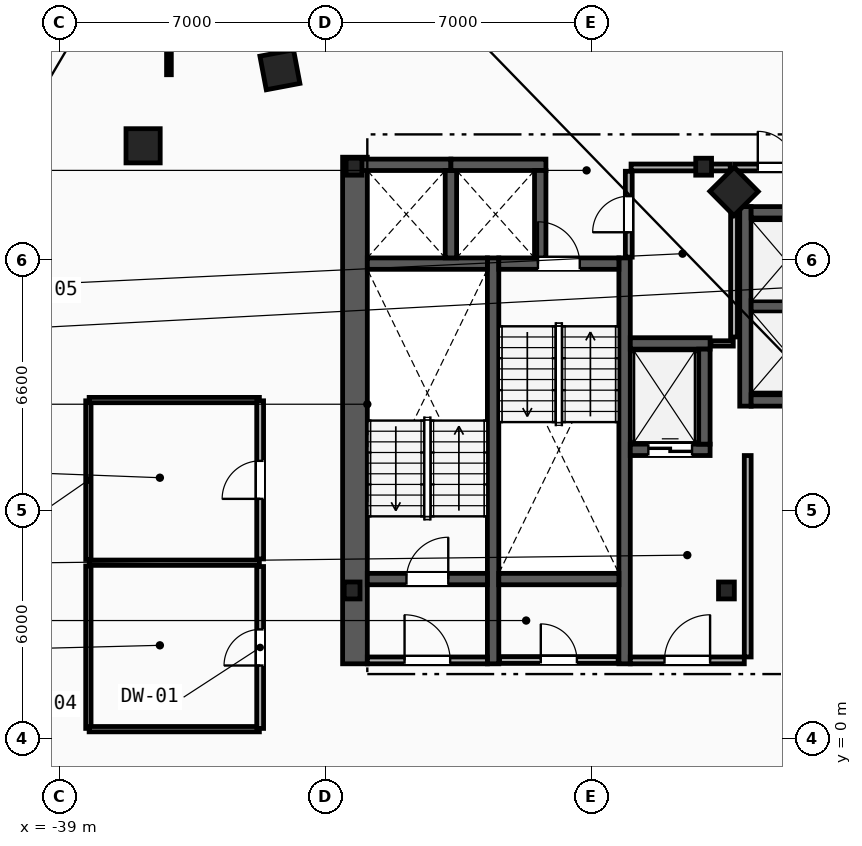
"""IFC4 building model, lengths in metres.
Left out: names, types, materials, properties, quantities, classifications, styles, units other than length and angle.
Written with IfcOpenShell. Run it as: python <this file> out.ifc"""

import sys

from ifc_helpers import new_model, si_unit, direction, frame, frame_2d, origin, origin_2d, place, context, subcontext, project, spatial, rectangle, i_section, extrude, element, fill, save


model = new_model("IFC4")
c1 = context("Model", 3, precision=1e-05, world=origin(), true_north=direction((0.0, 1.0)))
c2 = subcontext(c1, "Body", "Model", "MODEL_VIEW")
j1 = project(units=[si_unit("LENGTHUNIT", "METRE"), si_unit("PLANEANGLEUNIT", "RADIAN")], contexts=[c1])
p1 = place(None, origin())
s1 = spatial("IfcSite", under=j1, at=p1, CompositionType="ELEMENT")
p2 = place(p1, origin())
s2 = spatial("IfcBuilding", under=s1, at=p2, CompositionType="ELEMENT")
p3 = place(p2, frame((0.0, 0.0, 231.4)))
s3 = spatial("IfcBuildingStorey", under=s2, at=p3, CompositionType="ELEMENT", Elevation=231.4)
for number, where, z_axis, x_axis in (
    (1, (-31.3, 3.9, 0.0), (0.0, 0.0, 1.0), (1.0, 0.0, 0.0)),
    (2, (-21.45, 3.9, 0.0), (0.0, 0.0, 1.0), (1.0, 0.0, 0.0)),
    (3, (-22.05, 15.05, 0.0), (0.0, 0.0, 1.0), (1.0, 0.0, 0.0)),
    (4, (-31.25, 15.05, 0.0), (0.0, 0.0, 1.0), (1.0, 0.0, 0.0)),
):
    element("IfcColumn", number, at=place(p3, frame(where, z_axis=z_axis, x_axis=x_axis)), inside=s3, PredefinedType="COLUMN", context=c2, shape_type="SweptSolid", body=[
        extrude(i_section(OverallWidth=0.416, OverallDepth=0.446, WebThickness=0.039, FlangeThickness=0.063, FilletRadius=0.018, at=origin_2d()), origin(), (0.0, 0.0, 1.0), 3.6),
    ])
for number, where, z_axis, x_axis in (
    (5, (-36.8, 15.6, 0.0), (0.0, 0.0, 1.0), (1.0, 0.0, 0.0)),
    (6, (-21.25, 14.4, 0.0), (0.0, 0.0, 1.0), (-0.703, 0.711, 0.0)),
    (7, (-33.2, 17.6, 0.0), (0.0, 0.0, 1.0), (-0.983, -0.186, 0.0)),
):
    element("IfcColumn", number, at=place(p3, frame(where, z_axis=z_axis, x_axis=x_axis)), inside=s3, PredefinedType="COLUMN", context=c2, shape_type="SweptSolid", body=[
        extrude(rectangle(XDim=0.9, YDim=0.9, at=origin_2d()), origin(), (0.0, 0.0, 1.0), 3.6),
    ])
p4 = place(p3, frame((-31.225, 1.97, 0.0), z_axis=(0.0, 0.0, 1.0), x_axis=(0.0, 1.0, 0.0)))
e8 = element("IfcWall", 8, at=p4, inside=s3, PredefinedType="SHEAR", context=c2, shape_type="SweptSolid", body=[
    extrude(rectangle(XDim=13.33, YDim=0.65, at=frame_2d((6.665, 0.0))), origin(), (0.0, 0.0, 1.0), 3.32),
])
for number, where, z_axis, x_axis in (
    (9, (-27.59, 1.97, 0.0), (0.0, 0.0, 1.0), (0.0, 1.0, 0.0)),
    (10, (-24.13, 1.97, 0.0), (0.0, 0.0, 1.0), (0.0, 1.0, 0.0)),
):
    element("IfcWall", number, at=place(p3, frame(where, z_axis=z_axis, x_axis=x_axis)), inside=s3, PredefinedType="SHEAR", context=c2, shape_type="SweptSolid", body=[
        extrude(rectangle(XDim=10.68, YDim=0.3, at=frame_2d((5.34, 0.0))), origin(), (0.0, 0.0, 1.0), 3.32),
    ])
p5 = place(p3, frame((-30.9, 4.2, 0.0), z_axis=(0.0, 0.0, 1.0), x_axis=(1.0, 0.0, 0.0)))
e11 = element("IfcWall", 11, at=p5, inside=s3, PredefinedType="SHEAR", context=c2, shape_type="SweptSolid", body=[
    extrude(rectangle(XDim=3.16, YDim=0.3, at=frame_2d((1.58, 0.0))), origin(), (0.0, 0.0, 1.0), 3.32),
])
p6 = place(p5, frame((1.03, 0.0, 0.0)))
e12 = element("IfcOpeningElement", 12, at=p6, cuts=e11, PredefinedType="OPENING", context=c2, shape_type="SweptSolid", body=[
    extrude(rectangle(XDim=1.1, YDim=2.15, at=frame_2d((0.55, 1.075))), frame((0.0, 0.16, 0.0), z_axis=(0.0, -1.0, 0.0), x_axis=(1.0, 0.0, 0.0)), (0.0, 0.0, 1.0), 0.32),
])
p7 = place(p3, frame((-30.9, 12.5, 0.0), z_axis=(0.0, 0.0, 1.0), x_axis=(1.0, 0.0, 0.0)))
e13 = element("IfcWall", 13, at=p7, inside=s3, PredefinedType="SHEAR", context=c2, shape_type="SweptSolid", body=[
    extrude(rectangle(XDim=3.16, YDim=0.3, at=frame_2d((1.58, 0.0))), origin(), (0.0, 0.0, 1.0), 3.32),
])
p8 = place(p3, frame((-27.44, 12.5, 0.0), z_axis=(0.0, 0.0, 1.0), x_axis=(1.0, 0.0, 0.0)))
e14 = element("IfcWall", 14, at=p8, inside=s3, PredefinedType="SHEAR", context=c2, shape_type="SweptSolid", body=[
    extrude(rectangle(XDim=3.16, YDim=0.3, at=frame_2d((1.58, 0.0))), origin(), (0.0, 0.0, 1.0), 3.32),
])
p9 = place(p8, frame((1.03, 0.0, 0.0)))
e15 = element("IfcOpeningElement", 15, at=p9, cuts=e14, PredefinedType="OPENING", context=c2, shape_type="SweptSolid", body=[
    extrude(rectangle(XDim=1.1, YDim=2.15, at=frame_2d((0.55, 1.075))), frame((0.0, 0.16, 0.0), z_axis=(0.0, -1.0, 0.0), x_axis=(1.0, 0.0, 0.0)), (0.0, 0.0, 1.0), 0.32),
])
p10 = place(p3, frame((-27.44, 4.2, 0.0), z_axis=(0.0, 0.0, 1.0), x_axis=(1.0, 0.0, 0.0)))
e16 = element("IfcWall", 16, at=p10, inside=s3, PredefinedType="SHEAR", context=c2, shape_type="SweptSolid", body=[
    extrude(rectangle(XDim=3.16, YDim=0.3, at=frame_2d((1.58, 0.0))), origin(), (0.0, 0.0, 1.0), 3.32),
])
p11 = place(p3, frame((-20.89, 2.15, 0.0), z_axis=(0.0, 0.0, 1.0), x_axis=(0.0, 1.0, 0.0)))
e17 = element("IfcWall", 17, at=p11, inside=s3, PredefinedType="PARTITIONING", context=c2, shape_type="SweptSolid", body=[
    extrude(rectangle(XDim=5.3, YDim=0.18, at=frame_2d((2.65, 0.0))), origin(), (0.0, 0.0, 1.0), 3.32),
])
p12 = place(p3, frame((-23.98, 2.06, 0.0), z_axis=(0.0, 0.0, 1.0), x_axis=(1.0, 0.0, 0.0)))
e18 = element("IfcWall", 18, at=p12, inside=s3, PredefinedType="PARTITIONING", context=c2, shape_type="SweptSolid", body=[
    extrude(rectangle(XDim=3.0, YDim=0.18, at=frame_2d((1.5, 0.0))), origin(), (0.0, 0.0, 1.0), 3.32),
])
p13 = place(p12, frame((0.9, 0.0, 0.0)))
e19 = element("IfcOpeningElement", 19, at=p13, cuts=e18, PredefinedType="OPENING", context=c2, shape_type="SweptSolid", body=[
    extrude(rectangle(XDim=1.2, YDim=2.15, at=frame_2d((0.6, 1.075))), frame((0.0, 0.1, 0.0), z_axis=(0.0, -1.0, 0.0), x_axis=(1.0, 0.0, 0.0)), (0.0, 0.0, 1.0), 0.2),
])
p14 = place(p3, frame((-30.9, 2.06, 0.0), z_axis=(0.0, 0.0, 1.0), x_axis=(1.0, 0.0, 0.0)))
e20 = element("IfcWall", 20, at=p14, inside=s3, PredefinedType="PARTITIONING", context=c2, shape_type="SweptSolid", body=[
    extrude(rectangle(XDim=3.16, YDim=0.18, at=frame_2d((1.58, 0.0))), origin(), (0.0, 0.0, 1.0), 3.32),
])
p15 = place(p14, frame((0.98, 0.0, 0.0)))
e21 = element("IfcOpeningElement", 21, at=p15, cuts=e20, PredefinedType="OPENING", context=c2, shape_type="SweptSolid", body=[
    extrude(rectangle(XDim=1.2, YDim=2.15, at=frame_2d((0.6, 1.075))), frame((0.0, 0.1, 0.0), z_axis=(0.0, -1.0, 0.0), x_axis=(1.0, 0.0, 0.0)), (0.0, 0.0, 1.0), 0.2),
])
p16 = place(p3, frame((-23.98, 7.6, 0.0), z_axis=(0.0, 0.0, 1.0), x_axis=(1.0, 0.0, 0.0)))
e22 = element("IfcWall", 22, at=p16, inside=s3, PredefinedType="SHEAR", context=c2, shape_type="SweptSolid", body=[
    extrude(rectangle(XDim=2.1, YDim=0.3, at=frame_2d((1.05, 0.0))), origin(), (0.0, 0.0, 1.0), 3.32),
])
p17 = place(p16, frame((0.475, 0.0, 0.0)))
e23 = element("IfcOpeningElement", 23, at=p17, cuts=e22, PredefinedType="OPENING", context=c2, shape_type="SweptSolid", body=[
    extrude(rectangle(XDim=1.15, YDim=2.2, at=frame_2d((0.575, 1.1))), frame((0.0, 0.16, 0.0), z_axis=(0.0, -1.0, 0.0), x_axis=(1.0, 0.0, 0.0)), (0.0, 0.0, 1.0), 0.32),
])
p18 = place(p3, frame((-23.98, 10.4, 0.0), z_axis=(0.0, 0.0, 1.0), x_axis=(1.0, 0.0, 0.0)))
e24 = element("IfcWall", 24, at=p18, inside=s3, PredefinedType="SHEAR", context=c2, shape_type="SweptSolid", body=[
    extrude(rectangle(XDim=2.1, YDim=0.3, at=frame_2d((1.05, 0.0))), origin(), (0.0, 0.0, 1.0), 3.32),
])
for number, where, z_axis, x_axis in (
    (25, (-22.03, 7.75, 0.0), (0.0, 0.0, 1.0), (0.0, 1.0, 0.0)),
    (26, (-31.2, 15.1, 0.0), (0.0, 0.0, 1.0), (1.0, 0.0, 0.0)),
):
    element("IfcWall", number, at=place(p3, frame(where, z_axis=z_axis, x_axis=x_axis)), inside=s3, PredefinedType="SHEAR", context=c2, shape_type="SweptSolid", body=[
        extrude(rectangle(XDim=2.5, YDim=0.3, at=frame_2d((1.25, 0.0))), origin(), (0.0, 0.0, 1.0), 3.32),
    ])
p19 = place(p3, frame((-28.7, 12.65, 0.0), z_axis=(0.0, 0.0, 1.0), x_axis=(0.0, 1.0, 0.0)))
e27 = element("IfcWall", 27, at=p19, inside=s3, PredefinedType="SHEAR", context=c2, shape_type="SweptSolid", body=[
    extrude(rectangle(XDim=2.3, YDim=0.3, at=frame_2d((1.15, 0.0))), origin(), (0.0, 0.0, 1.0), 3.32),
])
p20 = place(p3, frame((-28.7, 15.1, 0.0), z_axis=(0.0, 0.0, 1.0), x_axis=(1.0, 0.0, 0.0)))
e28 = element("IfcWall", 28, at=p20, inside=s3, PredefinedType="SHEAR", context=c2, shape_type="SweptSolid", body=[
    extrude(rectangle(XDim=2.5, YDim=0.3, at=frame_2d((1.25, 0.0))), origin(), (0.0, 0.0, 1.0), 3.32),
])
p21 = place(p3, frame((-26.35, 12.65, 0.0), z_axis=(0.0, 0.0, 1.0), x_axis=(0.0, 1.0, 0.0)))
e29 = element("IfcWall", 29, at=p21, inside=s3, PredefinedType="SHEAR", context=c2, shape_type="SweptSolid", body=[
    extrude(rectangle(XDim=2.3, YDim=0.3, at=frame_2d((1.15, 0.0))), origin(), (0.0, 0.0, 1.0), 3.32),
])
p22 = place(p3, frame((-20.95, 8.75, 0.0), z_axis=(0.0, 0.0, 1.0), x_axis=(0.0, 1.0, 0.0)))
e30 = element("IfcWall", 30, at=p22, inside=s3, PredefinedType="SHEAR", context=c2, shape_type="SweptSolid", body=[
    extrude(rectangle(XDim=5.25, YDim=0.3, at=frame_2d((2.625, 0.0))), origin(), (0.0, 0.0, 1.0), 3.32),
])
for number, where, z_axis, x_axis in (
    (31, (-20.8, 8.9, 0.0), (0.0, 0.0, 1.0), (1.0, 0.0, 0.0)),
    (32, (-20.8, 13.85, 0.0), (0.0, 0.0, 1.0), (1.0, 0.0, 0.0)),
):
    element("IfcWall", number, at=place(p3, frame(where, z_axis=z_axis, x_axis=x_axis)), inside=s3, PredefinedType="SHEAR", context=c2, shape_type="SweptSolid", body=[
        extrude(rectangle(XDim=2.15, YDim=0.3, at=frame_2d((1.075, 0.0))), origin(), (0.0, 0.0, 1.0), 3.32),
    ])
p23 = place(p3, frame((-20.8, 11.375, 0.0), z_axis=(0.0, 0.0, 1.0), x_axis=(1.0, 0.0, 0.0)))
e33 = element("IfcWall", 33, at=p23, inside=s3, PredefinedType="SHEAR", context=c2, shape_type="SweptSolid", body=[
    extrude(rectangle(XDim=1.85, YDim=0.3, at=frame_2d((0.925, 0.0))), origin(), (0.0, 0.0, 1.0), 3.32),
])
p24 = place(p3, frame((-21.23, 15.03, 0.0), z_axis=(0.0, 0.0, 1.0), x_axis=(1.0, 0.0, 0.0)))
e34 = element("IfcWall", 34, at=p24, inside=s3, PredefinedType="PARTITIONING", context=c2, shape_type="SweptSolid", body=[
    extrude(rectangle(XDim=2.16, YDim=0.18, at=frame_2d((1.08, 0.0))), origin(), (0.0, 0.0, 1.0), 3.32),
])
p25 = place(p24, frame((0.605, 0.0, 0.0)))
e35 = element("IfcOpeningElement", 35, at=p25, cuts=e34, PredefinedType="OPENING", context=c2, shape_type="SweptSolid", body=[
    extrude(rectangle(XDim=0.95, YDim=2.1, at=frame_2d((0.475, 1.05))), frame((0.0, 0.1, 0.0), z_axis=(0.0, -1.0, 0.0), x_axis=(1.0, 0.0, 0.0)), (0.0, 0.0, 1.0), 0.2),
])
p26 = place(p3, frame((-21.86, 10.4, 0.0), z_axis=(0.0, 0.0, 1.0), x_axis=(1.0, 0.0, 0.0)))
e36 = element("IfcWall", 36, at=p26, inside=s3, PredefinedType="PARTITIONING", context=c2, shape_type="SweptSolid", body=[
    extrude(rectangle(XDim=0.59, YDim=0.14, at=frame_2d((0.295, 0.0))), origin(), (0.0, 0.0, 1.0), 3.32),
])
p27 = place(p3, frame((-21.25, 10.57, 0.0), z_axis=(0.0, 0.0, 1.0), x_axis=(0.0, 1.0, 0.0)))
e37 = element("IfcWall", 37, at=p27, inside=s3, PredefinedType="PARTITIONING", context=c2, shape_type="SweptSolid", body=[
    extrude(rectangle(XDim=4.36, YDim=0.18, at=frame_2d((2.18, 0.0))), origin(), (0.0, 0.0, 1.0), 3.32),
])
p28 = place(p3, frame((-23.96, 15.03, 0.0), z_axis=(0.0, 0.0, 1.0), x_axis=(1.0, 0.0, 0.0)))
e38 = element("IfcWall", 38, at=p28, inside=s3, PredefinedType="PARTITIONING", context=c2, shape_type="SweptSolid", body=[
    extrude(rectangle(XDim=2.61, YDim=0.18, at=frame_2d((1.305, 0.0))), origin(), (0.0, 0.0, 1.0), 2.393),
])
p29 = place(p3, frame((-27.42, 2.07, 0.0), z_axis=(0.0, 0.0, 1.0), x_axis=(1.0, 0.0, 0.0)))
e39 = element("IfcWall", 39, at=p29, inside=s3, PredefinedType="PARTITIONING", context=c2, shape_type="SweptSolid", body=[
    extrude(rectangle(XDim=3.12, YDim=0.18, at=frame_2d((1.56, 0.0))), origin(), (0.0, 0.0, 1.0), 3.32),
])
p30 = place(p29, frame((1.085, 0.0, 0.0)))
e40 = element("IfcOpeningElement", 40, at=p30, cuts=e39, PredefinedType="OPENING", context=c2, shape_type="SweptSolid", body=[
    extrude(rectangle(XDim=0.95, YDim=2.1, at=frame_2d((0.475, 1.05))), frame((0.0, 0.1, 0.0), z_axis=(0.0, -1.0, 0.0), x_axis=(1.0, 0.0, 0.0)), (0.0, 0.0, 1.0), 0.2),
])
p31 = place(p3, frame((-24.02, 12.67, 0.0), z_axis=(0.0, 0.0, 1.0), x_axis=(0.0, 1.0, 0.0)))
e41 = element("IfcWall", 41, at=p31, inside=s3, PredefinedType="PARTITIONING", context=c2, shape_type="SweptSolid", body=[
    extrude(rectangle(XDim=2.26, YDim=0.18, at=frame_2d((1.13, 0.0))), origin(), (0.0, 0.0, 1.0), 3.32),
])
p32 = place(p31, frame((0.655, 0.0, 0.0)))
e42 = element("IfcOpeningElement", 42, at=p32, cuts=e41, PredefinedType="OPENING", context=c2, shape_type="SweptSolid", body=[
    extrude(rectangle(XDim=0.95, YDim=2.1, at=frame_2d((0.475, 1.05))), frame((0.0, 0.1, 0.0), z_axis=(0.0, -1.0, 0.0), x_axis=(1.0, 0.0, 0.0)), (0.0, 0.0, 1.0), 0.2),
])
p33 = place(p3, frame((-38.24, 0.27, 0.0), z_axis=(0.0, 0.0, 1.0), x_axis=(0.0, 1.0, 0.0)))
e43 = element("IfcWall", 43, at=p33, inside=s3, PredefinedType="PARTITIONING", context=c2, shape_type="SweptSolid", body=[
    extrude(rectangle(XDim=4.275, YDim=0.14, at=frame_2d((2.137, 0.0))), origin(), (0.0, 0.0, 1.0), 3.32),
])
p34 = place(p3, frame((-38.24, 4.715, 0.0), z_axis=(0.0, 0.0, 1.0), x_axis=(0.0, 1.0, 0.0)))
e44 = element("IfcWall", 44, at=p34, inside=s3, PredefinedType="PARTITIONING", context=c2, shape_type="SweptSolid", body=[
    extrude(rectangle(XDim=4.175, YDim=0.14, at=frame_2d((2.087, 0.0))), origin(), (0.0, 0.0, 1.0), 3.32),
])
for number, where, z_axis, x_axis in (
    (45, (-38.22, 0.25, 0.0), (0.0, 0.0, 1.0), (1.0, 0.0, 0.0)),
    (46, (-38.22, 4.63, 0.0), (0.0, 0.0, 1.0), (1.0, 0.0, 0.0)),
    (47, (-38.22, 8.91, 0.0), (0.0, 0.0, 1.0), (1.0, 0.0, 0.0)),
):
    element("IfcWall", number, at=place(p3, frame(where, z_axis=z_axis, x_axis=x_axis)), inside=s3, PredefinedType="PARTITIONING", context=c2, shape_type="SweptSolid", body=[
        extrude(rectangle(XDim=4.48, YDim=0.14, at=frame_2d((2.24, 0.0))), origin(), (0.0, 0.0, 1.0), 3.32),
    ])
p35 = place(p3, frame((-33.72, 0.27, 0.0), z_axis=(0.0, 0.0, 1.0), x_axis=(0.0, 1.0, 0.0)))
e48 = element("IfcWall", 48, at=p35, inside=s3, PredefinedType="PARTITIONING", context=c2, shape_type="SweptSolid", body=[
    extrude(rectangle(XDim=4.26, YDim=0.18, at=frame_2d((2.13, 0.0))), origin(), (0.0, 0.0, 1.0), 3.32),
])
p36 = place(p35, frame((1.655, 0.0, 0.0)))
e49 = element("IfcOpeningElement", 49, at=p36, cuts=e48, PredefinedType="OPENING", context=c2, shape_type="SweptSolid", body=[
    extrude(rectangle(XDim=0.95, YDim=2.1, at=frame_2d((0.475, 1.05))), frame((0.0, 0.1, 0.0), z_axis=(0.0, -1.0, 0.0), x_axis=(1.0, 0.0, 0.0)), (0.0, 0.0, 1.0), 0.2),
])
p37 = place(p3, frame((-33.72, 4.73, 0.0), z_axis=(0.0, 0.0, 1.0), x_axis=(0.0, 1.0, 0.0)))
e50 = element("IfcWall", 50, at=p37, inside=s3, PredefinedType="PARTITIONING", context=c2, shape_type="SweptSolid", body=[
    extrude(rectangle(XDim=4.16, YDim=0.18, at=frame_2d((2.08, 0.0))), origin(), (0.0, 0.0, 1.0), 3.32),
])
p38 = place(p37, frame((1.58, 0.0, 0.0)))
e51 = element("IfcOpeningElement", 51, at=p38, cuts=e50, PredefinedType="OPENING", context=c2, shape_type="SweptSolid", body=[
    extrude(rectangle(XDim=1.0, YDim=2.15, at=frame_2d((0.5, 1.075))), frame((0.0, 0.1, 0.0), z_axis=(0.0, -1.0, 0.0), x_axis=(1.0, 0.0, 0.0)), (0.0, 0.0, 1.0), 0.2),
])
p39 = place(p3, frame((-36.12, 17.47, 0.0), z_axis=(0.0, 0.0, 1.0), x_axis=(0.0, 1.0, 0.0)))
e52 = element("IfcWall", 52, at=p39, inside=s3, PredefinedType="PARTITIONING", context=c2, shape_type="SweptSolid", body=[
    extrude(rectangle(XDim=7.344, YDim=0.125, at=frame_2d((3.672, 0.0))), origin(), (0.0, 0.0, 1.0), 3.32),
])
p40 = place(p6, origin())
e53 = element("IfcDoor", 53, at=p40, inside=s3, OperationType="SINGLE_SWING_RIGHT", PredefinedType="DOOR", context=c2, shape_type="SweptSolid", body=[
    extrude(rectangle(XDim=1.1, YDim=2.15, at=frame_2d((0.55, 1.075))), frame((0.0, 0.025, 0.0), z_axis=(0.0, -1.0, 0.0), x_axis=(1.0, 0.0, 0.0)), (0.0, 0.0, 1.0), 0.05),
])
fill(e12, e53)
p41 = place(p9, origin())
e54 = element("IfcDoor", 54, at=p41, inside=s3, OperationType="SINGLE_SWING_LEFT", PredefinedType="DOOR", context=c2, shape_type="SweptSolid", body=[
    extrude(rectangle(XDim=1.1, YDim=2.15, at=frame_2d((0.55, 1.075))), frame((0.0, 0.025, 0.0), z_axis=(0.0, -1.0, 0.0), x_axis=(1.0, 0.0, 0.0)), (0.0, 0.0, 1.0), 0.05),
])
fill(e15, e54)
p42 = place(p13, origin())
e55 = element("IfcDoor", 55, at=p42, inside=s3, OperationType="SINGLE_SWING_RIGHT", PredefinedType="DOOR", context=c2, shape_type="SweptSolid", body=[
    extrude(rectangle(XDim=1.2, YDim=2.15, at=frame_2d((0.6, 1.075))), frame((0.0, 0.025, 0.0), z_axis=(0.0, -1.0, 0.0), x_axis=(1.0, 0.0, 0.0)), (0.0, 0.0, 1.0), 0.05),
])
fill(e19, e55)
p43 = place(p15, origin())
e56 = element("IfcDoor", 56, at=p43, inside=s3, OperationType="SINGLE_SWING_LEFT", PredefinedType="DOOR", context=c2, shape_type="SweptSolid", body=[
    extrude(rectangle(XDim=1.2, YDim=2.15, at=frame_2d((0.6, 1.075))), frame((0.0, 0.025, 0.0), z_axis=(0.0, -1.0, 0.0), x_axis=(1.0, 0.0, 0.0)), (0.0, 0.0, 1.0), 0.05),
])
fill(e21, e56)
p44 = place(p17, origin())
e57 = element("IfcDoor", 57, at=p44, inside=s3, OperationType="SLIDING_TO_LEFT", PredefinedType="TRAPDOOR", context=c2, shape_type="SweptSolid", body=[
    extrude(rectangle(XDim=1.15, YDim=2.2, at=frame_2d((0.575, 1.1))), frame((0.0, 0.025, 0.0), z_axis=(0.0, -1.0, 0.0), x_axis=(1.0, 0.0, 0.0)), (0.0, 0.0, 1.0), 0.05),
])
fill(e23, e57)
p45 = place(p36, origin())
e58 = element("IfcDoor", 58, at=p45, inside=s3, OperationType="SINGLE_SWING_LEFT", PredefinedType="DOOR", context=c2, shape_type="SweptSolid", body=[
    extrude(rectangle(XDim=0.95, YDim=2.1, at=frame_2d((0.475, 1.05))), frame((0.0, 0.025, 0.0), z_axis=(0.0, -1.0, 0.0), x_axis=(1.0, 0.0, 0.0)), (0.0, 0.0, 1.0), 0.05),
])
fill(e49, e58)
p46 = place(p38, origin())
e59 = element("IfcDoor", 59, at=p46, inside=s3, OperationType="SINGLE_SWING_LEFT", PredefinedType="DOOR", context=c2, shape_type="SweptSolid", body=[
    extrude(rectangle(XDim=1.0, YDim=2.15, at=frame_2d((0.5, 1.075))), frame((0.0, 0.025, 0.0), z_axis=(0.0, -1.0, 0.0), x_axis=(1.0, 0.0, 0.0)), (0.0, 0.0, 1.0), 0.05),
])
fill(e51, e59)
p47 = place(p30, origin())
e60 = element("IfcDoor", 60, at=p47, inside=s3, OperationType="SINGLE_SWING_LEFT", PredefinedType="DOOR", context=c2, shape_type="SweptSolid", body=[
    extrude(rectangle(XDim=0.95, YDim=2.1, at=frame_2d((0.475, 1.05))), frame((0.0, 0.025, 0.0), z_axis=(0.0, -1.0, 0.0), x_axis=(1.0, 0.0, 0.0)), (0.0, 0.0, 1.0), 0.05),
])
fill(e40, e60)
p48 = place(p32, origin())
e61 = element("IfcDoor", 61, at=p48, inside=s3, OperationType="SINGLE_SWING_LEFT", PredefinedType="DOOR", context=c2, shape_type="SweptSolid", body=[
    extrude(rectangle(XDim=0.95, YDim=2.1, at=frame_2d((0.475, 1.05))), frame((0.0, 0.025, 0.0), z_axis=(0.0, -1.0, 0.0), x_axis=(1.0, 0.0, 0.0)), (0.0, 0.0, 1.0), 0.05),
])
fill(e42, e61)
p49 = place(p25, origin())
e62 = element("IfcDoor", 62, at=p49, inside=s3, OperationType="SINGLE_SWING_LEFT", PredefinedType="DOOR", context=c2, shape_type="SweptSolid", body=[
    extrude(rectangle(XDim=0.95, YDim=2.1, at=frame_2d((0.475, 1.05))), frame((0.0, 0.025, 0.0), z_axis=(0.0, -1.0, 0.0), x_axis=(1.0, 0.0, 0.0)), (0.0, 0.0, 1.0), 0.05),
])
fill(e35, e62)
save(model, sys.argv[1])
